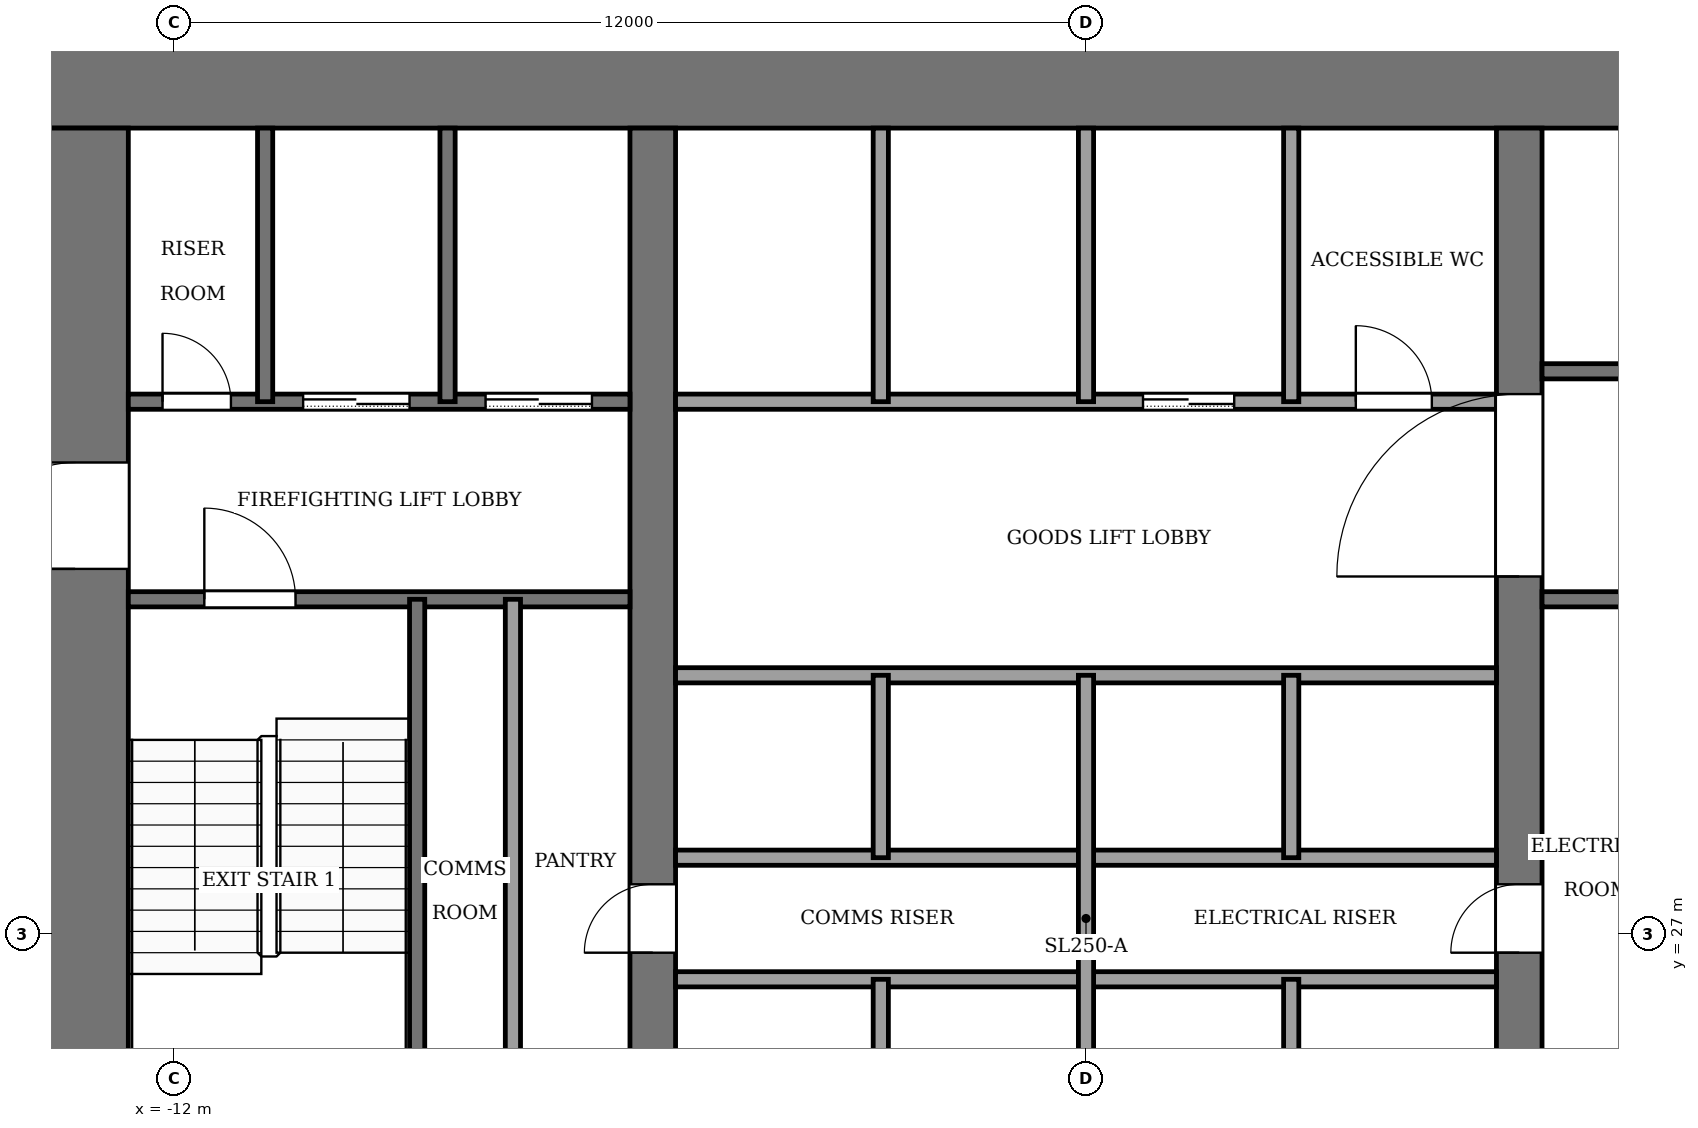
"""IFC4 building model, lengths in metres.
Left out: names, types, materials, properties, quantities, classifications, styles, units other than length and angle.
Written with IfcOpenShell. Run it as: python <this file> out.ifc"""

import sys

from ifc_helpers import new_model, si_unit, direction, frame, frame_2d, origin, place, context, subcontext, project, spatial, rectangle, extrude, element, fill, save


model = new_model("IFC4")
c1 = context("Model", 3, precision=1e-05, world=origin(), true_north=direction((0.0, 1.0)))
c2 = subcontext(c1, "Body", "Model", "MODEL_VIEW")
j1 = project(units=[si_unit("LENGTHUNIT", "METRE"), si_unit("PLANEANGLEUNIT", "RADIAN")], contexts=[c1])
p1 = place(None, origin())
s1 = spatial("IfcSite", under=j1, at=p1, CompositionType="ELEMENT")
p2 = place(p1, origin())
s2 = spatial("IfcBuilding", under=s1, at=p2, CompositionType="ELEMENT")
p3 = place(p2, frame((0.0, 0.0, 50.0)))
s3 = spatial("IfcBuildingStorey", under=s2, at=p3, CompositionType="ELEMENT", Elevation=50.0)
p4 = place(p3, frame((-14.0, 38.3, -0.13), z_axis=(0.0, 0.0, 1.0), x_axis=(1.0, 0.0, 0.0)))
e1 = element("IfcWall", 1, at=p4, inside=s3, PredefinedType="SHEAR", context=c2, shape_type="SweptSolid", body=[
    extrude(rectangle(XDim=28.0, YDim=1.4, at=frame_2d((14.0, 0.0))), origin(), (0.0, 0.0, 1.0), 4.0),
])
p5 = place(p3, frame((-13.3, 18.4, -0.13), z_axis=(0.0, 0.0, 1.0), x_axis=(0.0, 1.0, 0.0)))
e2 = element("IfcWall", 2, at=p5, inside=s3, PredefinedType="SHEAR", context=c2, shape_type="SweptSolid", body=[
    extrude(rectangle(XDim=19.2, YDim=1.4, at=frame_2d((9.6, 0.0))), origin(), (0.0, 0.0, 1.0), 4.0),
])
p6 = place(p5, frame((2.8, 0.0, 0.13)))
e3 = element("IfcOpeningElement", 3, at=p6, cuts=e2, PredefinedType="OPENING", context=c2, shape_type="SweptSolid", body=[
    extrude(rectangle(XDim=2.4, YDim=2.4, at=frame_2d((1.2, 1.2))), frame((0.0, 0.71, 0.0), z_axis=(0.0, -1.0, 0.0), x_axis=(1.0, 0.0, 0.0)), (0.0, 0.0, 1.0), 1.42),
])
p7 = place(p5, frame((13.4, 0.0, 0.13)))
e4 = element("IfcOpeningElement", 4, at=p7, cuts=e2, PredefinedType="OPENING", context=c2, shape_type="SweptSolid", body=[
    extrude(rectangle(XDim=1.4, YDim=2.2, at=frame_2d((0.7, 1.1))), frame((0.0, 0.71, 0.0), z_axis=(0.0, -1.0, 0.0), x_axis=(1.0, 0.0, 0.0)), (0.0, 0.0, 1.0), 1.42),
])
p8 = place(p3, frame((-5.7, 18.4, -0.13), z_axis=(0.0, 0.0, 1.0), x_axis=(0.0, 1.0, 0.0)))
e5 = element("IfcWall", 5, at=p8, inside=s3, PredefinedType="SHEAR", context=c2, shape_type="SweptSolid", body=[
    extrude(rectangle(XDim=19.2, YDim=0.6, at=frame_2d((9.6, 0.0))), origin(), (0.0, 0.0, 1.0), 4.0),
])
p9 = place(p8, frame((8.35, 0.0, 0.13)))
e6 = element("IfcOpeningElement", 6, at=p9, cuts=e5, PredefinedType="OPENING", context=c2, shape_type="SweptSolid", body=[
    extrude(rectangle(XDim=0.9, YDim=2.1, at=frame_2d((0.45, 1.05))), frame((0.0, 0.31, 0.0), z_axis=(0.0, -1.0, 0.0), x_axis=(1.0, 0.0, 0.0)), (0.0, 0.0, 1.0), 0.62),
])
p10 = place(p3, frame((5.7, 18.4, -0.13), z_axis=(0.0, 0.0, 1.0), x_axis=(0.0, 1.0, 0.0)))
e7 = element("IfcWall", 7, at=p10, inside=s3, PredefinedType="SHEAR", context=c2, shape_type="SweptSolid", body=[
    extrude(rectangle(XDim=19.2, YDim=0.6, at=frame_2d((9.6, 0.0))), origin(), (0.0, 0.0, 1.0), 4.0),
])
p11 = place(p10, frame((8.35, 0.0, 0.13)))
e8 = element("IfcOpeningElement", 8, at=p11, cuts=e7, PredefinedType="OPENING", context=c2, shape_type="SweptSolid", body=[
    extrude(rectangle(XDim=0.9, YDim=2.1, at=frame_2d((0.45, 1.05))), frame((0.0, 0.31, 0.0), z_axis=(0.0, -1.0, 0.0), x_axis=(1.0, 0.0, 0.0)), (0.0, 0.0, 1.0), 0.62),
])
p12 = place(p10, frame((13.3, 0.0, 0.13)))
e9 = element("IfcOpeningElement", 9, at=p12, cuts=e7, PredefinedType="OPENING", context=c2, shape_type="SweptSolid", body=[
    extrude(rectangle(XDim=2.4, YDim=2.4, at=frame_2d((1.2, 1.2))), frame((0.0, 0.31, 0.0), z_axis=(0.0, -1.0, 0.0), x_axis=(1.0, 0.0, 0.0)), (0.0, 0.0, 1.0), 0.62),
])
for number, where, z_axis, x_axis in (
    (10, (-5.4, 26.4, 0.0), (0.0, 0.0, 1.0), (1.0, 0.0, 0.0)),
    (11, (-5.4, 28.0, 0.0), (0.0, 0.0, 1.0), (1.0, 0.0, 0.0)),
    (12, (-5.4, 30.4, 0.0), (0.0, 0.0, 1.0), (1.0, 0.0, 0.0)),
):
    element("IfcWall", number, at=place(p3, frame(where, z_axis=z_axis, x_axis=x_axis)), inside=s3, PredefinedType="PARTITIONING", context=c2, shape_type="SweptSolid", body=[
        extrude(rectangle(XDim=10.8, YDim=0.2, at=frame_2d((5.4, 0.0))), origin(), (0.0, 0.0, 1.0), 3.87),
    ])
p13 = place(p3, frame((-12.6, 31.4, 0.0), z_axis=(0.0, 0.0, 1.0), x_axis=(1.0, 0.0, 0.0)))
e13 = element("IfcWall", 13, at=p13, inside=s3, PredefinedType="PARTITIONING", context=c2, shape_type="SweptSolid", body=[
    extrude(rectangle(XDim=6.6, YDim=0.2, at=frame_2d((3.3, 0.0))), origin(), (0.0, 0.0, 1.0), 3.87),
])
p14 = place(p13, frame((1.0, 0.0, 0.0)))
e14 = element("IfcOpeningElement", 14, at=p14, cuts=e13, PredefinedType="OPENING", context=c2, shape_type="SweptSolid", body=[
    extrude(rectangle(XDim=1.2, YDim=2.2, at=frame_2d((0.6, 1.1))), frame((0.0, 0.11, 0.0), z_axis=(0.0, -1.0, 0.0), x_axis=(1.0, 0.0, 0.0)), (0.0, 0.0, 1.0), 0.22),
])
p15 = place(p3, frame((6.0, 31.4, 0.0), z_axis=(0.0, 0.0, 1.0), x_axis=(1.0, 0.0, 0.0)))
e15 = element("IfcWall", 15, at=p15, inside=s3, PredefinedType="PARTITIONING", context=c2, shape_type="SweptSolid", body=[
    extrude(rectangle(XDim=6.6, YDim=0.2, at=frame_2d((3.3, 0.0))), origin(), (0.0, 0.0, 1.0), 3.87),
])
p16 = place(p3, frame((-12.6, 34.0, 0.0), z_axis=(0.0, 0.0, 1.0), x_axis=(1.0, 0.0, 0.0)))
e16 = element("IfcWall", 16, at=p16, inside=s3, PredefinedType="PARTITIONING", context=c2, shape_type="SweptSolid", body=[
    extrude(rectangle(XDim=6.6, YDim=0.2, at=frame_2d((3.3, 0.0))), origin(), (0.0, 0.0, 1.0), 3.87),
])
p17 = place(p16, frame((4.7, 0.0, 0.0)))
e17 = element("IfcOpeningElement", 17, at=p17, cuts=e16, PredefinedType="OPENING", context=c2, shape_type="SweptSolid", body=[
    extrude(rectangle(XDim=1.4, YDim=2.2, at=frame_2d((0.7, 1.1))), frame((0.0, 0.11, 0.0), z_axis=(0.0, -1.0, 0.0), x_axis=(1.0, 0.0, 0.0)), (0.0, 0.0, 1.0), 0.22),
])
p18 = place(p16, frame((2.3, 0.0, 0.0)))
e18 = element("IfcOpeningElement", 18, at=p18, cuts=e16, PredefinedType="OPENING", context=c2, shape_type="SweptSolid", body=[
    extrude(rectangle(XDim=1.4, YDim=2.2, at=frame_2d((0.7, 1.1))), frame((0.0, 0.11, 0.0), z_axis=(0.0, -1.0, 0.0), x_axis=(1.0, 0.0, 0.0)), (0.0, 0.0, 1.0), 0.22),
])
p19 = place(p16, frame((0.45, 0.0, 0.0)))
e19 = element("IfcOpeningElement", 19, at=p19, cuts=e16, PredefinedType="OPENING", context=c2, shape_type="SweptSolid", body=[
    extrude(rectangle(XDim=0.9, YDim=2.1, at=frame_2d((0.45, 1.05))), frame((0.0, 0.11, 0.0), z_axis=(0.0, -1.0, 0.0), x_axis=(1.0, 0.0, 0.0)), (0.0, 0.0, 1.0), 0.22),
])
p20 = place(p3, frame((-5.4, 34.0, 0.0), z_axis=(0.0, 0.0, 1.0), x_axis=(1.0, 0.0, 0.0)))
e20 = element("IfcWall", 20, at=p20, inside=s3, PredefinedType="PARTITIONING", context=c2, shape_type="SweptSolid", body=[
    extrude(rectangle(XDim=10.8, YDim=0.2, at=frame_2d((5.4, 0.0))), origin(), (0.0, 0.0, 1.0), 3.87),
])
p21 = place(p20, frame((6.15, 0.0, 0.0)))
e21 = element("IfcOpeningElement", 21, at=p21, cuts=e20, PredefinedType="OPENING", context=c2, shape_type="SweptSolid", body=[
    extrude(rectangle(XDim=1.2, YDim=2.2, at=frame_2d((0.6, 1.1))), frame((0.0, 0.11, 0.0), z_axis=(0.0, -1.0, 0.0), x_axis=(1.0, 0.0, 0.0)), (0.0, 0.0, 1.0), 0.22),
])
p22 = place(p20, frame((8.95, 0.0, 0.0)))
e22 = element("IfcOpeningElement", 22, at=p22, cuts=e20, PredefinedType="OPENING", context=c2, shape_type="SweptSolid", body=[
    extrude(rectangle(XDim=1.0, YDim=2.1, at=frame_2d((0.5, 1.05))), frame((0.0, 0.11, 0.0), z_axis=(0.0, -1.0, 0.0), x_axis=(1.0, 0.0, 0.0)), (0.0, 0.0, 1.0), 0.22),
])
p23 = place(p3, frame((6.0, 34.4, 0.0), z_axis=(0.0, 0.0, 1.0), x_axis=(1.0, 0.0, 0.0)))
e23 = element("IfcWall", 23, at=p23, inside=s3, PredefinedType="PARTITIONING", context=c2, shape_type="SweptSolid", body=[
    extrude(rectangle(XDim=6.6, YDim=0.2, at=frame_2d((3.3, 0.0))), origin(), (0.0, 0.0, 1.0), 3.87),
])
p24 = place(p23, frame((4.8, 0.0, 0.0)))
e24 = element("IfcOpeningElement", 24, at=p24, cuts=e23, PredefinedType="OPENING", context=c2, shape_type="SweptSolid", body=[
    extrude(rectangle(XDim=1.2, YDim=2.2, at=frame_2d((0.6, 1.1))), frame((0.0, 0.11, 0.0), z_axis=(0.0, -1.0, 0.0), x_axis=(1.0, 0.0, 0.0)), (0.0, 0.0, 1.0), 0.22),
])
p25 = place(p3, frame((-10.8, 34.0, 0.0), z_axis=(0.0, 0.0, 1.0), x_axis=(0.0, 1.0, 0.0)))
e25 = element("IfcWall", 25, at=p25, inside=s3, PredefinedType="PARTITIONING", context=c2, shape_type="SweptSolid", body=[
    extrude(rectangle(XDim=3.6, YDim=0.2, at=frame_2d((1.8, 0.0))), origin(), (0.0, 0.0, 1.0), 3.87),
])
p26 = place(p3, frame((-8.8, 24.0, 0.0), z_axis=(0.0, 0.0, 1.0), x_axis=(0.0, 1.0, 0.0)))
e26 = element("IfcWall", 26, at=p26, inside=s3, PredefinedType="PARTITIONING", context=c2, shape_type="SweptSolid", body=[
    extrude(rectangle(XDim=7.4, YDim=0.2, at=frame_2d((3.7, 0.0))), origin(), (0.0, 0.0, 1.0), 3.87),
])
p27 = place(p3, frame((-8.4, 34.0, 0.0), z_axis=(0.0, 0.0, 1.0), x_axis=(0.0, 1.0, 0.0)))
e27 = element("IfcWall", 27, at=p27, inside=s3, PredefinedType="PARTITIONING", context=c2, shape_type="SweptSolid", body=[
    extrude(rectangle(XDim=3.6, YDim=0.2, at=frame_2d((1.8, 0.0))), origin(), (0.0, 0.0, 1.0), 3.87),
])
p28 = place(p3, frame((-7.54, 24.0, 0.0), z_axis=(0.0, 0.0, 1.0), x_axis=(0.0, 1.0, 0.0)))
e28 = element("IfcWall", 28, at=p28, inside=s3, PredefinedType="PARTITIONING", context=c2, shape_type="SweptSolid", body=[
    extrude(rectangle(XDim=7.4, YDim=0.2, at=frame_2d((3.7, 0.0))), origin(), (0.0, 0.0, 1.0), 3.87),
])
for number, where, z_axis, x_axis in (
    (29, (-2.7, 24.0, 0.0), (0.0, 0.0, 1.0), (0.0, 1.0, 0.0)),
    (30, (-2.7, 28.0, 0.0), (0.0, 0.0, 1.0), (0.0, 1.0, 0.0)),
):
    element("IfcWall", number, at=place(p3, frame(where, z_axis=z_axis, x_axis=x_axis)), inside=s3, PredefinedType="PARTITIONING", context=c2, shape_type="SweptSolid", body=[
        extrude(rectangle(XDim=2.4, YDim=0.2, at=frame_2d((1.2, 0.0))), origin(), (0.0, 0.0, 1.0), 3.87),
    ])
p29 = place(p3, frame((-2.7, 34.0, 0.0), z_axis=(0.0, 0.0, 1.0), x_axis=(0.0, 1.0, 0.0)))
e31 = element("IfcWall", 31, at=p29, inside=s3, PredefinedType="PARTITIONING", context=c2, shape_type="SweptSolid", body=[
    extrude(rectangle(XDim=3.6, YDim=0.2, at=frame_2d((1.8, 0.0))), origin(), (0.0, 0.0, 1.0), 3.87),
])
p30 = place(p3, frame((0.0, 24.0, 0.0), z_axis=(0.0, 0.0, 1.0), x_axis=(0.0, 1.0, 0.0)))
e32 = element("IfcWall", 32, at=p30, inside=s3, PredefinedType="PARTITIONING", context=c2, shape_type="SweptSolid", body=[
    extrude(rectangle(XDim=6.4, YDim=0.2, at=frame_2d((3.2, 0.0))), origin(), (0.0, 0.0, 1.0), 3.87),
])
p31 = place(p3, frame((0.0, 34.0, 0.0), z_axis=(0.0, 0.0, 1.0), x_axis=(0.0, 1.0, 0.0)))
e33 = element("IfcWall", 33, at=p31, inside=s3, PredefinedType="PARTITIONING", context=c2, shape_type="SweptSolid", body=[
    extrude(rectangle(XDim=3.6, YDim=0.2, at=frame_2d((1.8, 0.0))), origin(), (0.0, 0.0, 1.0), 3.87),
])
for number, where, z_axis, x_axis in (
    (34, (2.7, 24.0, 0.0), (0.0, 0.0, 1.0), (0.0, 1.0, 0.0)),
    (35, (2.7, 28.0, 0.0), (0.0, 0.0, 1.0), (0.0, 1.0, 0.0)),
):
    element("IfcWall", number, at=place(p3, frame(where, z_axis=z_axis, x_axis=x_axis)), inside=s3, PredefinedType="PARTITIONING", context=c2, shape_type="SweptSolid", body=[
        extrude(rectangle(XDim=2.4, YDim=0.2, at=frame_2d((1.2, 0.0))), origin(), (0.0, 0.0, 1.0), 3.87),
    ])
p32 = place(p3, frame((2.7, 34.0, 0.0), z_axis=(0.0, 0.0, 1.0), x_axis=(0.0, 1.0, 0.0)))
e36 = element("IfcWall", 36, at=p32, inside=s3, PredefinedType="PARTITIONING", context=c2, shape_type="SweptSolid", body=[
    extrude(rectangle(XDim=3.6, YDim=0.2, at=frame_2d((1.8, 0.0))), origin(), (0.0, 0.0, 1.0), 3.87),
])
p33 = place(p21, origin())
e37 = element("IfcDoor", 37, at=p33, inside=s3, OperationType="SLIDING_TO_LEFT", PredefinedType="DOOR", context=c2, shape_type="SweptSolid", body=[
    extrude(rectangle(XDim=1.2, YDim=2.2, at=frame_2d((0.6, 1.1))), frame((0.0, 0.025, 0.0), z_axis=(0.0, -1.0, 0.0), x_axis=(1.0, 0.0, 0.0)), (0.0, 0.0, 1.0), 0.05),
])
fill(e21, e37)
p34 = place(p17, origin())
e38 = element("IfcDoor", 38, at=p34, inside=s3, OperationType="SLIDING_TO_LEFT", PredefinedType="DOOR", context=c2, shape_type="SweptSolid", body=[
    extrude(rectangle(XDim=1.4, YDim=2.2, at=frame_2d((0.7, 1.1))), frame((0.0, 0.025, 0.0), z_axis=(0.0, -1.0, 0.0), x_axis=(1.0, 0.0, 0.0)), (0.0, 0.0, 1.0), 0.05),
])
fill(e17, e38)
p35 = place(p18, origin())
e39 = element("IfcDoor", 39, at=p35, inside=s3, OperationType="SLIDING_TO_LEFT", PredefinedType="DOOR", context=c2, shape_type="SweptSolid", body=[
    extrude(rectangle(XDim=1.4, YDim=2.2, at=frame_2d((0.7, 1.1))), frame((0.0, 0.025, 0.0), z_axis=(0.0, -1.0, 0.0), x_axis=(1.0, 0.0, 0.0)), (0.0, 0.0, 1.0), 0.05),
])
fill(e18, e39)
p36 = place(p19, origin())
e40 = element("IfcDoor", 40, at=p36, inside=s3, OperationType="SINGLE_SWING_RIGHT", PredefinedType="DOOR", context=c2, shape_type="SweptSolid", body=[
    extrude(rectangle(XDim=0.9, YDim=2.1, at=frame_2d((0.45, 1.05))), frame((0.0, 0.025, 0.0), z_axis=(0.0, -1.0, 0.0), x_axis=(1.0, 0.0, 0.0)), (0.0, 0.0, 1.0), 0.05),
])
fill(e19, e40)
p37 = place(p22, origin())
e41 = element("IfcDoor", 41, at=p37, inside=s3, OperationType="SINGLE_SWING_LEFT", PredefinedType="DOOR", context=c2, shape_type="SweptSolid", body=[
    extrude(rectangle(XDim=1.0, YDim=2.1, at=frame_2d((0.5, 1.05))), frame((0.0, 0.025, 0.0), z_axis=(0.0, -1.0, 0.0), x_axis=(1.0, 0.0, 0.0)), (0.0, 0.0, 1.0), 0.05),
])
fill(e22, e41)
p38 = place(p9, origin())
e42 = element("IfcDoor", 42, at=p38, inside=s3, OperationType="SINGLE_SWING_RIGHT", PredefinedType="DOOR", context=c2, shape_type="SweptSolid", body=[
    extrude(rectangle(XDim=0.9, YDim=2.1, at=frame_2d((0.45, 1.05))), frame((0.0, 0.025, 0.0), z_axis=(0.0, -1.0, 0.0), x_axis=(1.0, 0.0, 0.0)), (0.0, 0.0, 1.0), 0.05),
])
fill(e6, e42)
p39 = place(p11, origin())
e43 = element("IfcDoor", 43, at=p39, inside=s3, OperationType="SINGLE_SWING_LEFT", PredefinedType="DOOR", context=c2, shape_type="SweptSolid", body=[
    extrude(rectangle(XDim=0.9, YDim=2.1, at=frame_2d((0.45, 1.05))), frame((0.0, 0.025, 0.0), z_axis=(0.0, -1.0, 0.0), x_axis=(1.0, 0.0, 0.0)), (0.0, 0.0, 1.0), 0.05),
])
fill(e8, e43)
p40 = place(p14, origin())
e44 = element("IfcDoor", 44, at=p40, inside=s3, OperationType="SINGLE_SWING_LEFT", PredefinedType="DOOR", context=c2, shape_type="SweptSolid", body=[
    extrude(rectangle(XDim=1.2, YDim=2.2, at=frame_2d((0.6, 1.1))), frame((0.0, 0.025, 0.0), z_axis=(0.0, -1.0, 0.0), x_axis=(1.0, 0.0, 0.0)), (0.0, 0.0, 1.0), 0.05),
])
fill(e14, e44)
p41 = place(p12, origin())
e45 = element("IfcDoor", 45, at=p41, inside=s3, OperationType="DOUBLE_DOOR_SINGLE_SWING", PredefinedType="DOOR", context=c2, shape_type="SweptSolid", body=[
    extrude(rectangle(XDim=2.4, YDim=2.4, at=frame_2d((1.2, 1.2))), frame((0.0, 0.025, 0.0), z_axis=(0.0, -1.0, 0.0), x_axis=(1.0, 0.0, 0.0)), (0.0, 0.0, 1.0), 0.05),
])
fill(e9, e45)
p42 = place(p7, origin())
e46 = element("IfcDoor", 46, at=p42, inside=s3, OperationType="SINGLE_SWING_LEFT", PredefinedType="DOOR", context=c2, shape_type="SweptSolid", body=[
    extrude(rectangle(XDim=1.4, YDim=2.2, at=frame_2d((0.7, 1.1))), frame((0.0, 0.025, 0.0), z_axis=(0.0, -1.0, 0.0), x_axis=(1.0, 0.0, 0.0)), (0.0, 0.0, 1.0), 0.05),
])
fill(e4, e46)
save(model, sys.argv[1])
